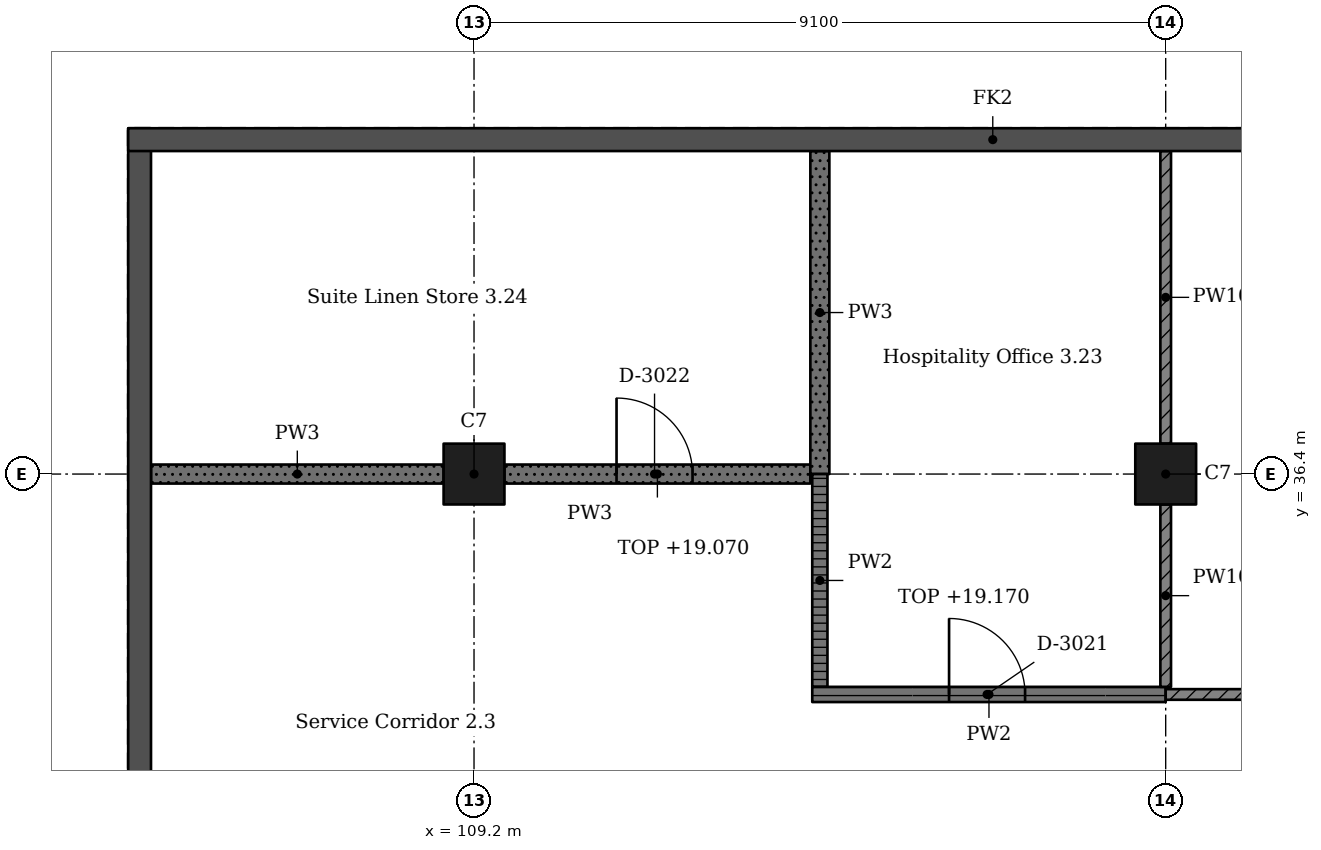
"""IFC4 building model, lengths in metres.
Left out: names, types, materials, properties, quantities, classifications, styles, units other than length and angle.
Written with IfcOpenShell. Run it as: python <this file> out.ifc"""

import sys

from ifc_helpers import new_model, si_unit, direction, frame, frame_2d, origin, origin_2d, place, context, subcontext, project, spatial, rectangle, extrude, element, fill, save


model = new_model("IFC4")
c1 = context("Model", 3, precision=1e-05, world=origin(), true_north=direction((0.0, 1.0)))
c2 = subcontext(c1, "Body", "Model", "MODEL_VIEW")
j1 = project(units=[si_unit("LENGTHUNIT", "METRE"), si_unit("PLANEANGLEUNIT", "RADIAN")], contexts=[c1])
p1 = place(None, origin())
s1 = spatial("IfcSite", under=j1, at=p1, CompositionType="ELEMENT")
p2 = place(p1, origin())
s2 = spatial("IfcBuilding", under=s1, at=p2, CompositionType="ELEMENT")
p3 = place(p2, frame((0.0, 0.0, 15.47)))
s3 = spatial("IfcBuildingStorey", under=s2, at=p3, CompositionType="ELEMENT", Elevation=15.47)
for number, where, z_axis, x_axis in (
    (1, (109.2, 36.4, 0.0), (0.0, 0.0, 1.0), (1.0, 0.0, 0.0)),
    (2, (118.3, 36.4, 0.0), (0.0, 0.0, 1.0), (1.0, 0.0, 0.0)),
):
    element("IfcColumn", number, at=place(p3, frame(where, z_axis=z_axis, x_axis=x_axis)), inside=s3, PredefinedType="COLUMN", context=c2, shape_type="SweptSolid", body=[
        extrude(rectangle(XDim=0.8, YDim=0.8, at=origin_2d()), origin(), (0.0, 0.0, 1.0), 4.55),
    ])
for number, where, z_axis, x_axis in (
    (3, (104.8, 40.95, 0.0), (0.0, 0.0, 1.0), (0.0, -1.0, 0.0)),
    (4, (104.65, 40.8, 0.0), (0.0, 0.0, 1.0), (1.0, 0.0, 0.0)),
):
    element("IfcWall", number, at=place(p3, frame(where, z_axis=z_axis, x_axis=x_axis)), inside=s3, PredefinedType="SHEAR", context=c2, shape_type="SweptSolid", body=[
        extrude(rectangle(XDim=22.75, YDim=0.3, at=frame_2d((11.375, 0.0))), origin(), (0.0, 0.0, 1.0), 4.55),
    ])
p4 = place(p3, frame((108.8, 36.4, 0.0), z_axis=(0.0, 0.0, 1.0), x_axis=(-1.0, 0.0, 0.0)))
e5 = element("IfcWall", 5, at=p4, inside=s3, PredefinedType="SOLIDWALL", context=c2, shape_type="SweptSolid", body=[
    extrude(rectangle(XDim=3.85, YDim=0.25, at=frame_2d((1.925, 0.0))), origin(), (0.0, 0.0, 1.0), 4.3),
])
p5 = place(p3, frame((113.625, 36.4, 0.0), z_axis=(0.0, 0.0, 1.0), x_axis=(-1.0, 0.0, 0.0)))
e6 = element("IfcWall", 6, at=p5, inside=s3, PredefinedType="SOLIDWALL", context=c2, shape_type="SweptSolid", body=[
    extrude(rectangle(XDim=4.025, YDim=0.25, at=frame_2d((2.012, 0.0))), origin(), (0.0, 0.0, 1.0), 3.6),
])
p6 = place(p5, frame((1.55, 0.0, 0.0)))
e7 = element("IfcOpeningElement", 7, at=p6, cuts=e6, PredefinedType="OPENING", context=c2, shape_type="SweptSolid", body=[
    extrude(rectangle(XDim=1.0, YDim=2.1, at=frame_2d((0.5, 1.05))), frame((0.0, 0.135, 0.0), z_axis=(0.0, -1.0, 0.0), x_axis=(1.0, 0.0, 0.0)), (0.0, 0.0, 1.0), 0.27),
])
p7 = place(p3, frame((113.75, 33.6, 0.0), z_axis=(0.0, 0.0, 1.0), x_axis=(0.0, 1.0, 0.0)))
e8 = element("IfcWall", 8, at=p7, inside=s3, PredefinedType="PARTITIONING", context=c2, shape_type="SweptSolid", body=[
    extrude(rectangle(XDim=2.8, YDim=0.2, at=frame_2d((1.4, 0.0))), origin(), (0.0, 0.0, 1.0), 3.7),
])
p8 = place(p3, frame((113.75, 36.4, 0.0), z_axis=(0.0, 0.0, 1.0), x_axis=(0.0, 1.0, 0.0)))
e9 = element("IfcWall", 9, at=p8, inside=s3, PredefinedType="SOLIDWALL", context=c2, shape_type="SweptSolid", body=[
    extrude(rectangle(XDim=4.25, YDim=0.25, at=frame_2d((2.125, 0.0))), origin(), (0.0, 0.0, 1.0), 4.3),
])
p9 = place(p3, frame((118.3, 33.5, 0.0), z_axis=(0.0, 0.0, 1.0), x_axis=(-1.0, 0.0, 0.0)))
e10 = element("IfcWall", 10, at=p9, inside=s3, PredefinedType="PARTITIONING", context=c2, shape_type="SweptSolid", body=[
    extrude(rectangle(XDim=4.65, YDim=0.2, at=frame_2d((2.325, 0.0))), origin(), (0.0, 0.0, 1.0), 4.3),
])
p10 = place(p9, frame((1.85, 0.0, 0.0)))
e11 = element("IfcOpeningElement", 11, at=p10, cuts=e10, PredefinedType="OPENING", context=c2, shape_type="SweptSolid", body=[
    extrude(rectangle(XDim=1.0, YDim=2.1, at=frame_2d((0.5, 1.05))), frame((0.0, 0.11, 0.0), z_axis=(0.0, -1.0, 0.0), x_axis=(1.0, 0.0, 0.0)), (0.0, 0.0, 1.0), 0.22),
])
p11 = place(p3, frame((118.3, 33.6, 0.0), z_axis=(0.0, 0.0, 1.0), x_axis=(0.0, 1.0, 0.0)))
e12 = element("IfcWall", 12, at=p11, inside=s3, PredefinedType="SOLIDWALL", context=c2, shape_type="SweptSolid", body=[
    extrude(rectangle(XDim=2.4, YDim=0.14, at=frame_2d((1.2, 0.0))), origin(), (0.0, 0.0, 1.0), 3.6),
])
p12 = place(p3, frame((118.3, 36.8, 0.0), z_axis=(0.0, 0.0, 1.0), x_axis=(0.0, 1.0, 0.0)))
e13 = element("IfcWall", 13, at=p12, inside=s3, PredefinedType="SOLIDWALL", context=c2, shape_type="SweptSolid", body=[
    extrude(rectangle(XDim=3.85, YDim=0.14, at=frame_2d((1.925, 0.0))), origin(), (0.0, 0.0, 1.0), 4.3),
])
p13 = place(p3, frame((127.4, 33.5, 0.0), z_axis=(0.0, 0.0, 1.0), x_axis=(-1.0, 0.0, 0.0)))
e14 = element("IfcWall", 14, at=p13, inside=s3, PredefinedType="SOLIDWALL", context=c2, shape_type="SweptSolid", body=[
    extrude(rectangle(XDim=9.1, YDim=0.14, at=frame_2d((4.55, 0.0))), origin(), (0.0, 0.0, 1.0), 4.3),
])
p14 = place(p13, frame((3.85, 0.0, 0.0)))
e15 = element("IfcOpeningElement", 15, at=p14, cuts=e14, PredefinedType="OPENING", context=c2, shape_type="SweptSolid", body=[
    extrude(rectangle(XDim=1.5, YDim=2.1, at=frame_2d((0.75, 1.05))), frame((0.0, 0.08, 0.0), z_axis=(0.0, -1.0, 0.0), x_axis=(1.0, 0.0, 0.0)), (0.0, 0.0, 1.0), 0.16),
])
p15 = place(p10, origin())
e16 = element("IfcDoor", 16, at=p15, inside=s3, OperationType="SINGLE_SWING_RIGHT", PredefinedType="DOOR", context=c2, shape_type="SweptSolid", body=[
    extrude(rectangle(XDim=1.0, YDim=2.1, at=frame_2d((0.5, 1.05))), frame((0.0, 0.025, 0.0), z_axis=(0.0, -1.0, 0.0), x_axis=(1.0, 0.0, 0.0)), (0.0, 0.0, 1.0), 0.05),
])
fill(e11, e16)
p16 = place(p6, origin())
e17 = element("IfcDoor", 17, at=p16, inside=s3, OperationType="SINGLE_SWING_RIGHT", PredefinedType="DOOR", context=c2, shape_type="SweptSolid", body=[
    extrude(rectangle(XDim=1.0, YDim=2.1, at=frame_2d((0.5, 1.05))), frame((0.0, 0.025, 0.0), z_axis=(0.0, -1.0, 0.0), x_axis=(1.0, 0.0, 0.0)), (0.0, 0.0, 1.0), 0.05),
])
fill(e7, e17)
save(model, sys.argv[1])
